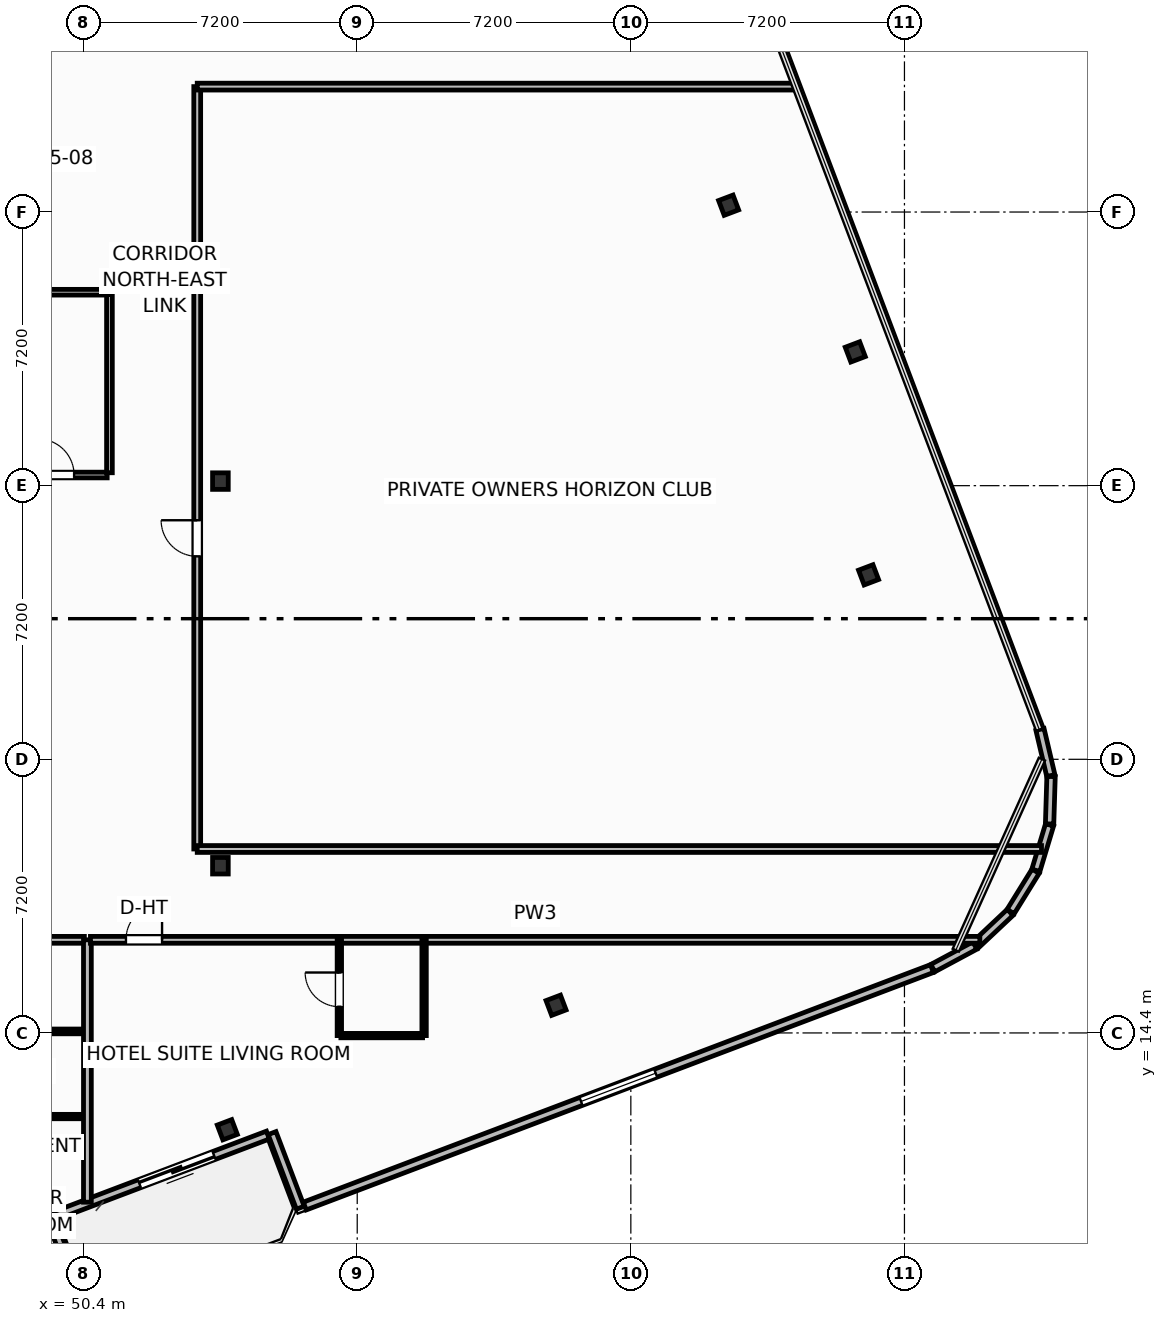
"""IFC4 building model, lengths in metres.
Left out: names, types, materials, properties, quantities, classifications, styles, units other than length and angle.
Written with IfcOpenShell. Run it as: python <this file> out.ifc"""

import sys

from ifc_helpers import new_model, si_unit, direction, frame, frame_2d, origin, origin_2d, place, context, subcontext, project, spatial, rectangle, i_section, extrude, element, fill, save


model = new_model("IFC4")
c1 = context("Model", 3, precision=1e-05, world=origin(), true_north=direction((0.0, 1.0)))
c2 = subcontext(c1, "Body", "Model", "MODEL_VIEW")
j1 = project(units=[si_unit("LENGTHUNIT", "METRE"), si_unit("PLANEANGLEUNIT", "RADIAN")], contexts=[c1])
p1 = place(None, origin())
s1 = spatial("IfcSite", under=j1, at=p1, CompositionType="ELEMENT")
p2 = place(p1, origin())
s2 = spatial("IfcBuilding", under=s1, at=p2, CompositionType="ELEMENT")
p3 = place(p2, frame((0.0, 0.0, 212.7)))
s3 = spatial("IfcBuildingStorey", under=s2, at=p3, CompositionType="ELEMENT", Elevation=212.7)
for number, where, z_axis, x_axis in (
    (1, (54.0, 18.8, 0.0), (0.0, 0.0, 1.0), (1.0, 0.0, 0.0)),
    (2, (54.0, 28.92, 0.0), (0.0, 0.0, 1.0), (1.0, 0.0, 0.0)),
):
    element("IfcColumn", number, at=place(p3, frame(where, z_axis=z_axis, x_axis=x_axis)), inside=s3, PredefinedType="COLUMN", context=c2, shape_type="SweptSolid", body=[
        extrude(i_section(OverallWidth=0.412, OverallDepth=0.435, WebThickness=0.036, FlangeThickness=0.057, FilletRadius=0.025, at=origin_2d()), origin(), (0.0, 0.0, 1.0), 3.7),
    ])
for number, where, z_axis, x_axis in (
    (3, (54.181, 11.853, 0.0), (0.0, 0.0, 1.0), (0.935, 0.354, 0.0)),
    (4, (62.832, 15.128, 0.0), (0.0, 0.0, 1.0), (0.935, 0.354, 0.0)),
    (5, (71.055, 26.453, 0.0), (0.0, 0.0, 1.0), (0.935, 0.354, 0.0)),
    (6, (70.706, 32.32, 0.0), (0.0, 0.0, 1.0), (0.935, 0.354, 0.0)),
    (7, (67.373, 36.18, 0.0), (0.0, 0.0, 1.0), (0.935, 0.354, 0.0)),
):
    element("IfcColumn", number, at=place(p3, frame(where, z_axis=z_axis, x_axis=x_axis)), inside=s3, PredefinedType="COLUMN", context=c2, shape_type="SweptSolid", body=[
        extrude(i_section(OverallWidth=0.406, OverallDepth=0.416, WebThickness=0.03, FlangeThickness=0.048, FilletRadius=0.025, at=origin_2d()), origin(), (0.0, 0.0, 1.0), 3.7),
    ])
p4 = place(p3, frame((55.25, 11.713, 0.0), z_axis=(0.0, 0.0, 1.0), x_axis=(-0.935227640088, -0.354046976001, 0.0)))
e8 = element("IfcWall", 8, at=p4, inside=s3, PredefinedType="SOLIDWALL", context=c2, shape_type="SweptSolid", body=[
    extrude(rectangle(XDim=6.0, YDim=0.22, at=frame_2d((3.0, 0.0))), origin(), (0.0, 0.0, 1.0), 2.73),
])
p5 = place(p4, frame((1.516, 0.0, 0.0)))
e9 = element("IfcOpeningElement", 9, at=p5, cuts=e8, PredefinedType="OPENING", context=c2, shape_type="SweptSolid", body=[
    extrude(rectangle(XDim=2.1, YDim=2.3, at=frame_2d((1.05, 1.15))), frame((0.0, 0.12, 0.0), z_axis=(0.0, -1.0, 0.0), x_axis=(1.0, 0.0, 0.0)), (0.0, 0.0, 1.0), 0.24),
])
p6 = place(p3, frame((50.223, 7.708, 0.0), z_axis=(0.0, 0.0, 1.0), x_axis=(-0.354020680661, 0.935237594232, 0.0)))
e10 = element("IfcWall", 10, at=p6, inside=s3, PredefinedType="SOLIDWALL", context=c2, shape_type="SweptSolid", body=[
    extrude(rectangle(XDim=1.975, YDim=0.22, at=frame_2d((0.988, 0.0))), origin(), (0.0, 0.0, 1.0), 2.73),
])
p7 = place(p3, frame((55.359, 11.764, 0.0), z_axis=(0.0, 0.0, 1.0), x_axis=(0.354026782794, -0.935235284334, 0.0)))
e11 = element("IfcWall", 11, at=p7, inside=s3, PredefinedType="SOLIDWALL", context=c2, shape_type="SweptSolid", body=[
    extrude(rectangle(XDim=2.1, YDim=0.22, at=frame_2d((1.05, 0.0))), origin(), (0.0, 0.0, 1.0), 2.73),
])
p8 = place(p3, frame((56.219, 9.845, 0.0), z_axis=(0.0, 0.0, 1.0), x_axis=(0.935225601791, 0.354052360188, 0.0)))
e12 = element("IfcWall", 12, at=p8, inside=s3, PredefinedType="SOLIDWALL", context=c2, shape_type="SweptSolid", body=[
    extrude(rectangle(XDim=17.647, YDim=0.22, at=frame_2d((8.824, 0.0))), origin(), (0.0, 0.0, 1.0), 2.73),
])
p9 = place(p8, frame((7.774, 0.0, 0.8)))
e13 = element("IfcOpeningElement", 13, at=p9, cuts=e12, PredefinedType="OPENING", context=c2, shape_type="SweptSolid", body=[
    extrude(rectangle(XDim=2.1, YDim=1.75, at=frame_2d((1.05, 0.875))), frame((0.0, 0.12, 0.0), z_axis=(0.0, -1.0, 0.0), x_axis=(1.0, 0.0, 0.0)), (0.0, 0.0, 1.0), 0.24),
])
p10 = place(p3, frame((72.746, 16.105, 0.0), z_axis=(0.0, 0.0, 1.0), x_axis=(0.881112879796, 0.472906008693, 0.0)))
e14 = element("IfcWall", 14, at=p10, inside=s3, PredefinedType="SOLIDWALL", context=c2, shape_type="SweptSolid", body=[
    extrude(rectangle(XDim=1.257, YDim=0.22, at=frame_2d((0.628, 0.0))), origin(), (0.0, 0.0, 1.0), 2.73),
])
p11 = place(p3, frame((73.871, 16.717, 0.0), z_axis=(0.0, 0.0, 1.0), x_axis=(0.728475443486, 0.685071914647, 0.0)))
e15 = element("IfcWall", 15, at=p11, inside=s3, PredefinedType="SOLIDWALL", context=c2, shape_type="SweptSolid", body=[
    extrude(rectangle(XDim=1.249, YDim=0.22, at=frame_2d((0.625, 0.0))), origin(), (0.0, 0.0, 1.0), 2.73),
])
for number, where, z_axis, x_axis in (
    (16, (74.794, 17.593, 0.0), (0.0, 0.0, 1.0), (0.527, 0.85, 0.0)),
    (17, (75.458, 18.679, 0.0), (0.0, 0.0, 1.0), (0.288, 0.958, 0.0)),
):
    element("IfcWall", number, at=place(p3, frame(where, z_axis=z_axis, x_axis=x_axis)), inside=s3, PredefinedType="SOLIDWALL", context=c2, shape_type="SweptSolid", body=[
        extrude(rectangle(XDim=1.249, YDim=0.22, at=frame_2d((0.624, 0.0))), origin(), (0.0, 0.0, 1.0), 2.73),
    ])
p12 = place(p3, frame((75.819, 19.899, 0.0), z_axis=(0.0, 0.0, 1.0), x_axis=(0.030898954628, 0.999522513305, 0.0)))
e18 = element("IfcWall", 18, at=p12, inside=s3, PredefinedType="SOLIDWALL", context=c2, shape_type="SweptSolid", body=[
    extrude(rectangle(XDim=1.248, YDim=0.22, at=frame_2d((0.624, 0.0))), origin(), (0.0, 0.0, 1.0), 2.73),
])
p13 = place(p3, frame((75.852, 21.172, 0.0), z_axis=(0.0, 0.0, 1.0), x_axis=(-0.228941257463, 0.973440239887, 0.0)))
e19 = element("IfcWall", 19, at=p13, inside=s3, PredefinedType="SOLIDWALL", context=c2, shape_type="SweptSolid", body=[
    extrude(rectangle(XDim=1.249, YDim=0.22, at=frame_2d((0.625, 0.0))), origin(), (0.0, 0.0, 1.0), 2.73),
])
p14 = place(p3, frame((40.58, 16.85, 0.0), z_axis=(0.0, 0.0, 1.0), x_axis=(1.0, 0.0, 0.0)))
e20 = element("IfcWall", 20, at=p14, inside=s3, PredefinedType="PARTITIONING", context=c2, shape_type="SweptSolid", body=[
    extrude(rectangle(XDim=9.84, YDim=0.18, at=frame_2d((4.92, 0.0))), origin(), (0.0, 0.0, 1.0), 3.45),
])
p15 = place(p14, frame((2.302, 0.0, 0.0)))
e21 = element("IfcOpeningElement", 21, at=p15, cuts=e20, PredefinedType="OPENING", context=c2, shape_type="SweptSolid", body=[
    extrude(rectangle(XDim=1.0, YDim=2.2, at=frame_2d((0.5, 1.1))), frame((0.0, 0.1, 0.0), z_axis=(0.0, -1.0, 0.0), x_axis=(1.0, 0.0, 0.0)), (0.0, 0.0, 1.0), 0.2),
])
p16 = place(p3, frame((46.325, 14.44, 0.0), z_axis=(0.0, 0.0, 1.0), x_axis=(1.0, 0.0, 0.0)))
e22 = element("IfcWall", 22, at=p16, inside=s3, PredefinedType="PARTITIONING", context=c2, shape_type="SweptSolid", body=[
    extrude(rectangle(XDim=4.095, YDim=0.125, at=frame_2d((2.047, 0.0))), origin(), (0.0, 0.0, 1.0), 3.45),
])
p17 = place(p3, frame((46.325, 12.2, 0.0), z_axis=(0.0, 0.0, 1.0), x_axis=(1.0, 0.0, 0.0)))
e23 = element("IfcWall", 23, at=p17, inside=s3, PredefinedType="PARTITIONING", context=c2, shape_type="SweptSolid", body=[
    extrude(rectangle(XDim=4.095, YDim=0.115, at=frame_2d((2.047, 0.0))), origin(), (0.0, 0.0, 1.0), 3.45),
])
p18 = place(p3, frame((50.5, 9.946, 0.0), z_axis=(0.0, 0.0, 1.0), x_axis=(0.0, 1.0, 0.0)))
e24 = element("IfcWall", 24, at=p18, inside=s3, PredefinedType="PARTITIONING", context=c2, shape_type="SweptSolid", body=[
    extrude(rectangle(XDim=6.904, YDim=0.205, at=frame_2d((3.452, 0.0))), origin(), (0.0, 0.0, 1.0), 3.45),
])
p19 = place(p3, frame((50.58, 16.85, 0.0), z_axis=(0.0, 0.0, 1.0), x_axis=(1.0, 0.0, 0.0)))
e25 = element("IfcWall", 25, at=p19, inside=s3, PredefinedType="PARTITIONING", context=c2, shape_type="SweptSolid", body=[
    extrude(rectangle(XDim=23.404, YDim=0.18, at=frame_2d((11.702, 0.0))), origin(), (0.0, 0.0, 1.0), 3.45),
])
p20 = place(p19, frame((0.935, 0.0, 0.0)))
e26 = element("IfcOpeningElement", 26, at=p20, cuts=e25, PredefinedType="OPENING", context=c2, shape_type="SweptSolid", body=[
    extrude(rectangle(XDim=0.95, YDim=2.15, at=frame_2d((0.475, 1.075))), frame((0.0, 0.1, 0.0), z_axis=(0.0, -1.0, 0.0), x_axis=(1.0, 0.0, 0.0)), (0.0, 0.0, 1.0), 0.2),
])
p21 = place(p3, frame((57.17, 14.33, 0.0), z_axis=(0.0, 0.0, 1.0), x_axis=(1.0, 0.0, 0.0)))
e27 = element("IfcWall", 27, at=p21, inside=s3, PredefinedType="PARTITIONING", context=c2, shape_type="SweptSolid", body=[
    extrude(rectangle(XDim=2.15, YDim=0.115, at=frame_2d((1.075, 0.0))), origin(), (0.0, 0.0, 1.0), 3.45),
])
p22 = place(p3, frame((57.13, 14.33, 0.0), z_axis=(0.0, 0.0, 1.0), x_axis=(0.0, 1.0, 0.0)))
e28 = element("IfcWall", 28, at=p22, inside=s3, PredefinedType="PARTITIONING", context=c2, shape_type="SweptSolid", body=[
    extrude(rectangle(XDim=2.52, YDim=0.115, at=frame_2d((1.26, 0.0))), origin(), (0.0, 0.0, 1.0), 3.45),
])
p23 = place(p22, frame((0.76, 0.0, 0.0)))
e29 = element("IfcOpeningElement", 29, at=p23, cuts=e28, PredefinedType="OPENING", context=c2, shape_type="SweptSolid", body=[
    extrude(rectangle(XDim=0.9, YDim=2.05, at=frame_2d((0.45, 1.025))), frame((0.0, 0.067, 0.0), z_axis=(0.0, -1.0, 0.0), x_axis=(1.0, 0.0, 0.0)), (0.0, 0.0, 1.0), 0.135),
])
p24 = place(p3, frame((59.36, 14.33, 0.0), z_axis=(0.0, 0.0, 1.0), x_axis=(0.0, 1.0, 0.0)))
e30 = element("IfcWall", 30, at=p24, inside=s3, PredefinedType="PARTITIONING", context=c2, shape_type="SweptSolid", body=[
    extrude(rectangle(XDim=2.52, YDim=0.115, at=frame_2d((1.26, 0.0))), origin(), (0.0, 0.0, 1.0), 3.45),
])
p25 = place(p3, frame((53.39, 19.24, 0.0), z_axis=(0.0, 0.0, 1.0), x_axis=(0.0, 1.0, 0.0)))
e31 = element("IfcWall", 31, at=p25, inside=s3, PredefinedType="PARTITIONING", context=c2, shape_type="SweptSolid", body=[
    extrude(rectangle(XDim=20.06, YDim=0.18, at=frame_2d((10.03, 0.0))), origin(), (0.0, 0.0, 1.0), 3.45),
])
p26 = place(p25, frame((7.7, 0.0, 0.0)))
e32 = element("IfcOpeningElement", 32, at=p26, cuts=e31, PredefinedType="OPENING", context=c2, shape_type="SweptSolid", body=[
    extrude(rectangle(XDim=0.95, YDim=2.05, at=frame_2d((0.475, 1.025))), frame((0.0, 0.1, 0.0), z_axis=(0.0, -1.0, 0.0), x_axis=(1.0, 0.0, 0.0)), (0.0, 0.0, 1.0), 0.2),
])
p27 = place(p3, frame((53.39, 19.24, 0.0), z_axis=(0.0, 0.0, 1.0), x_axis=(1.0, 0.0, 0.0)))
e33 = element("IfcWall", 33, at=p27, inside=s3, PredefinedType="PARTITIONING", context=c2, shape_type="SweptSolid", body=[
    extrude(rectangle(XDim=22.217, YDim=0.18, at=frame_2d((11.108, 0.0))), origin(), (0.0, 0.0, 1.0), 3.45),
])
p28 = place(p3, frame((53.39, 39.3, 0.0), z_axis=(0.0, 0.0, 1.0), x_axis=(1.0, 0.0, 0.0)))
e34 = element("IfcWall", 34, at=p28, inside=s3, PredefinedType="PARTITIONING", context=c2, shape_type="SweptSolid", body=[
    extrude(rectangle(XDim=15.713, YDim=0.18, at=frame_2d((7.856, 0.0))), origin(), (0.0, 0.0, 1.0), 3.45),
])
p29 = place(p3, frame((48.3, 29.08, 0.0), z_axis=(0.0, 0.0, 1.0), x_axis=(1.0, 0.0, 0.0)))
e35 = element("IfcWall", 35, at=p29, inside=s3, PredefinedType="PARTITIONING", context=c2, shape_type="SweptSolid", body=[
    extrude(rectangle(XDim=2.72, YDim=0.15, at=frame_2d((1.36, 0.0))), origin(), (0.0, 0.0, 1.0), 2.662),
])
p30 = place(p29, frame((0.9, 0.0, 0.0)))
e36 = element("IfcOpeningElement", 36, at=p30, cuts=e35, PredefinedType="OPENING", context=c2, shape_type="SweptSolid", body=[
    extrude(rectangle(XDim=0.95, YDim=2.05, at=frame_2d((0.475, 1.025))), frame((0.0, 0.085, 0.0), z_axis=(0.0, -1.0, 0.0), x_axis=(1.0, 0.0, 0.0)), (0.0, 0.0, 1.0), 0.17),
])
p31 = place(p3, frame((48.3, 33.89, 0.0), z_axis=(0.0, 0.0, 1.0), x_axis=(1.0, 0.0, 0.0)))
e37 = element("IfcWall", 37, at=p31, inside=s3, PredefinedType="PARTITIONING", context=c2, shape_type="SweptSolid", body=[
    extrude(rectangle(XDim=2.72, YDim=0.15, at=frame_2d((1.36, 0.0))), origin(), (0.0, 0.0, 1.0), 3.45),
])
p32 = place(p3, frame((51.08, 29.14, 0.0), z_axis=(0.0, 0.0, 1.0), x_axis=(0.0, 1.0, 0.0)))
e38 = element("IfcWall", 38, at=p32, inside=s3, PredefinedType="PARTITIONING", context=c2, shape_type="SweptSolid", body=[
    extrude(rectangle(XDim=4.69, YDim=0.15, at=frame_2d((2.345, 0.0))), origin(), (0.0, 0.0, 1.0), 3.45),
])
p33 = place(p5, origin())
e39 = element("IfcDoor", 39, at=p33, inside=s3, OperationType="SLIDING_TO_LEFT", PredefinedType="DOOR", context=c2, shape_type="SweptSolid", body=[
    extrude(rectangle(XDim=2.1, YDim=2.3, at=frame_2d((1.05, 1.15))), frame((0.0, 0.025, 0.0), z_axis=(0.0, -1.0, 0.0), x_axis=(1.0, 0.0, 0.0)), (0.0, 0.0, 1.0), 0.05),
])
fill(e9, e39)
p34 = place(p9, origin())
e40 = element("IfcWindow", 40, at=p34, inside=s3, PartitioningType="SINGLE_PANEL", PredefinedType="WINDOW", context=c2, shape_type="SweptSolid", body=[
    extrude(rectangle(XDim=2.1, YDim=1.75, at=frame_2d((1.05, 0.875))), frame((0.0, 0.03, 0.0), z_axis=(0.0, -1.0, 0.0), x_axis=(1.0, 0.0, 0.0)), (0.0, 0.0, 1.0), 0.06),
])
fill(e13, e40)
p35 = place(p20, origin())
e41 = element("IfcDoor", 41, at=p35, inside=s3, OperationType="SINGLE_SWING_RIGHT", PredefinedType="DOOR", context=c2, shape_type="SweptSolid", body=[
    extrude(rectangle(XDim=0.95, YDim=2.15, at=frame_2d((0.475, 1.075))), frame((0.0, 0.025, 0.0), z_axis=(0.0, -1.0, 0.0), x_axis=(1.0, 0.0, 0.0)), (0.0, 0.0, 1.0), 0.05),
])
fill(e26, e41)
p36 = place(p23, origin())
e42 = element("IfcDoor", 42, at=p36, inside=s3, OperationType="SINGLE_SWING_RIGHT", PredefinedType="DOOR", context=c2, shape_type="SweptSolid", body=[
    extrude(rectangle(XDim=0.9, YDim=2.05, at=frame_2d((0.45, 1.025))), frame((0.0, 0.025, 0.0), z_axis=(0.0, -1.0, 0.0), x_axis=(1.0, 0.0, 0.0)), (0.0, 0.0, 1.0), 0.05),
])
fill(e29, e42)
p37 = place(p26, origin())
e43 = element("IfcDoor", 43, at=p37, inside=s3, OperationType="SINGLE_SWING_RIGHT", PredefinedType="DOOR", context=c2, shape_type="SweptSolid", body=[
    extrude(rectangle(XDim=0.95, YDim=2.05, at=frame_2d((0.475, 1.025))), frame((0.0, 0.025, 0.0), z_axis=(0.0, -1.0, 0.0), x_axis=(1.0, 0.0, 0.0)), (0.0, 0.0, 1.0), 0.05),
])
fill(e32, e43)
p38 = place(p30, origin())
e44 = element("IfcDoor", 44, at=p38, inside=s3, OperationType="SINGLE_SWING_LEFT", PredefinedType="DOOR", context=c2, shape_type="SweptSolid", body=[
    extrude(rectangle(XDim=0.95, YDim=2.05, at=frame_2d((0.475, 1.025))), frame((0.0, 0.025, 0.0), z_axis=(0.0, -1.0, 0.0), x_axis=(1.0, 0.0, 0.0)), (0.0, 0.0, 1.0), 0.05),
])
fill(e36, e44)
save(model, sys.argv[1])
